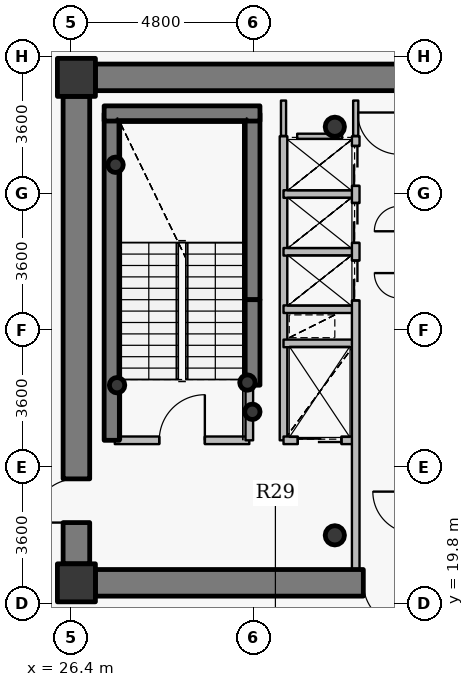
"""IFC4 building model, lengths in metres.
Left out: names, types, materials, properties, quantities, classifications, styles, units other than length and angle.
Written with IfcOpenShell. Run it as: python <this file> out.ifc"""

import sys

from ifc_helpers import new_model, si_unit, direction, frame, frame_2d, origin, origin_2d, place, context, subcontext, project, spatial, rectangle, hollow_circle, extrude, source, transform, mapped, element, fill, save


model = new_model("IFC4")
c1 = context("Model", 3, precision=1e-05, world=origin(), true_north=direction((0.0, 1.0)))
c2 = subcontext(c1, "Body", "Model", "MODEL_VIEW")
j1 = project(units=[si_unit("LENGTHUNIT", "METRE"), si_unit("PLANEANGLEUNIT", "RADIAN")], contexts=[c1])
p1 = place(None, origin())
s1 = spatial("IfcSite", under=j1, at=p1, CompositionType="ELEMENT")
p2 = place(p1, origin())
s2 = spatial("IfcBuilding", under=s1, at=p2, CompositionType="ELEMENT")
p3 = place(p2, frame((0.0, 0.0, 236.55)))
s3 = spatial("IfcBuildingStorey", under=s2, at=p3, CompositionType="ELEMENT", Elevation=236.55)
for number, where, z_axis, x_axis in (
    (1, (26.55, 20.35, 0.0), (0.0, 0.0, 1.0), (1.0, 0.0, 0.0)),
    (2, (26.55, 33.65, 0.0), (0.0, 0.0, 1.0), (1.0, 0.0, 0.0)),
):
    element("IfcColumn", number, at=place(p3, frame(where, z_axis=z_axis, x_axis=x_axis)), inside=s3, PredefinedType="COLUMN", context=c2, shape_type="SweptSolid", body=[
        extrude(rectangle(XDim=1.0, YDim=1.0, at=origin_2d()), origin(), (0.0, 0.0, 1.0), 3.75),
    ])
for number, where, z_axis, x_axis in (
    (3, (33.35, 21.6, 0.0), (0.0, 0.0, 1.0), (1.0, 0.0, 0.0)),
    (4, (33.35, 32.35, 0.0), (0.0, 0.0, 1.0), (1.0, 0.0, 0.0)),
):
    element("IfcColumn", number, at=place(p3, frame(where, z_axis=z_axis, x_axis=x_axis)), inside=s3, PredefinedType="COLUMN", context=c2, shape_type="SweptSolid", body=[
        extrude(hollow_circle(Radius=0.254, WallThickness=0.02, at=origin_2d()), origin(), (0.0, 0.0, 1.0), 3.75),
    ])
p4 = place(p3, frame((27.48, 24.1, 0.0), z_axis=(0.0, 0.0, 1.0), x_axis=(0.0, 1.0, 0.0)))
e5 = element("IfcWall", 5, at=p4, inside=s3, PredefinedType="SHEAR", context=c2, shape_type="SweptSolid", body=[
    extrude(rectangle(XDim=8.6, YDim=0.4, at=frame_2d((4.3, 0.0))), origin(), (0.0, 0.0, 1.0), 3.75),
])
p5 = place(p3, frame((31.18, 27.8, 0.0), z_axis=(0.0, 0.0, 1.0), x_axis=(0.0, 1.0, 0.0)))
e6 = element("IfcWall", 6, at=p5, inside=s3, PredefinedType="SHEAR", context=c2, shape_type="SweptSolid", body=[
    extrude(rectangle(XDim=4.9, YDim=0.4, at=frame_2d((2.45, 0.0))), origin(), (0.0, 0.0, 1.0), 3.75),
])
p6 = place(p3, frame((27.28, 32.7, 0.0), z_axis=(0.0, 0.0, 1.0), x_axis=(1.0, 0.0, 0.0)))
e7 = element("IfcWall", 7, at=p6, inside=s3, PredefinedType="SHEAR", context=c2, shape_type="SweptSolid", body=[
    extrude(rectangle(XDim=4.1, YDim=0.4, at=frame_2d((2.05, 0.0))), origin(), (0.0, 0.0, 1.0), 3.75),
])
for number, where, z_axis, x_axis in (
    (8, (27.58, 31.35, 0.0), (0.0, 0.0, 1.0), (1.0, 0.0, 0.0)),
    (9, (31.05, 25.62, 0.0), (0.0, 0.0, 1.0), (1.0, 0.0, 0.0)),
    (10, (31.18, 24.85, 0.0), (0.0, 0.0, 1.0), (1.0, 0.0, 0.0)),
    (11, (27.62, 25.55, 0.0), (0.0, 0.0, 1.0), (1.0, 0.0, 0.0)),
):
    element("IfcColumn", number, at=place(p3, frame(where, z_axis=z_axis, x_axis=x_axis)), inside=s3, PredefinedType="COLUMN", context=c2, shape_type="SweptSolid", body=[
        extrude(hollow_circle(Radius=0.203, WallThickness=0.016, at=origin_2d()), origin(), (0.0, 0.0, 1.0), 3.75),
    ])
p7 = place(p3, frame((27.05, 33.65, 0.0), z_axis=(0.0, 0.0, 1.0), x_axis=(1.0, 0.0, 0.0)))
e12 = element("IfcWall", 12, at=p7, inside=s3, PredefinedType="SHEAR", context=c2, shape_type="SweptSolid", body=[
    extrude(rectangle(XDim=17.9, YDim=0.7, at=frame_2d((8.95, 0.0))), origin(), (0.0, 0.0, 1.0), 3.05),
])
p8 = place(p7, frame((13.675, 0.0, 0.0)))
e13 = element("IfcOpeningElement", 13, at=p8, cuts=e12, PredefinedType="OPENING", context=c2, shape_type="SweptSolid", body=[
    extrude(rectangle(XDim=1.15, YDim=2.15, at=origin_2d()), frame((0.575, 0.36, 1.075), z_axis=(0.0, -1.0, 0.0), x_axis=(1.0, 0.0, 0.0)), (0.0, 0.0, 1.0), 0.72),
])
p9 = place(p3, frame((44.95, 20.35, 0.0), z_axis=(0.0, 0.0, 1.0), x_axis=(-1.0, 0.0, 0.0)))
e14 = element("IfcWall", 14, at=p9, inside=s3, PredefinedType="SHEAR", context=c2, shape_type="SweptSolid", body=[
    extrude(rectangle(XDim=17.9, YDim=0.7, at=frame_2d((8.95, 0.0))), origin(), (0.0, 0.0, 1.0), 3.05),
])
p10 = place(p9, frame((9.7, 0.0, 0.0)))
e15 = element("IfcOpeningElement", 15, at=p10, cuts=e14, PredefinedType="OPENING", context=c2, shape_type="SweptSolid", body=[
    extrude(rectangle(XDim=1.15, YDim=2.15, at=origin_2d()), frame((0.575, 0.36, 1.075), z_axis=(0.0, -1.0, 0.0), x_axis=(1.0, 0.0, 0.0)), (0.0, 0.0, 1.0), 0.72),
])
p11 = place(p3, frame((26.55, 20.85, 0.0), z_axis=(0.0, 0.0, 1.0), x_axis=(0.0, 1.0, 0.0)))
e16 = element("IfcWall", 16, at=p11, inside=s3, PredefinedType="SHEAR", context=c2, shape_type="SweptSolid", body=[
    extrude(rectangle(XDim=12.3, YDim=0.7, at=frame_2d((6.15, 0.0))), origin(), (0.0, 0.0, 1.0), 3.05),
])
p12 = place(p11, frame((1.085, 0.0, 0.0)))
e17 = element("IfcOpeningElement", 17, at=p12, cuts=e16, PredefinedType="OPENING", context=c2, shape_type="SweptSolid", body=[
    extrude(rectangle(XDim=1.15, YDim=2.15, at=origin_2d()), frame((0.575, 0.36, 1.075), z_axis=(0.0, -1.0, 0.0), x_axis=(1.0, 0.0, 0.0)), (0.0, 0.0, 1.0), 0.72),
])
p13 = place(p3, frame((31.18, 25.55, 0.0), z_axis=(0.0, 0.0, 1.0), x_axis=(0.0, 1.0, 0.0)))
e18 = element("IfcWall", 18, at=p13, inside=s3, PredefinedType="SHEAR", context=c2, shape_type="SweptSolid", body=[
    extrude(rectangle(XDim=2.25, YDim=0.4, at=frame_2d((1.125, 0.0))), origin(), (0.0, 0.0, 1.0), 3.1),
])
p14 = place(p3, frame((27.56, 24.1, 0.0), z_axis=(0.0, 0.0, 1.0), x_axis=(1.0, 0.0, 0.0)))
e19 = element("IfcWall", 19, at=p14, inside=s3, PredefinedType="PARTITIONING", context=c2, shape_type="SweptSolid", body=[
    extrude(rectangle(XDim=3.54, YDim=0.2, at=frame_2d((1.77, 0.0))), origin(), (0.0, 0.0, 1.0), 3.5),
])
p15 = place(p14, frame((1.17, 0.0, 0.0)))
e20 = element("IfcOpeningElement", 20, at=p15, cuts=e19, PredefinedType="OPENING", context=c2, shape_type="SweptSolid", body=[
    extrude(rectangle(XDim=1.2, YDim=2.15, at=origin_2d()), frame((0.6, 0.11, 1.075), z_axis=(0.0, -1.0, 0.0), x_axis=(1.0, 0.0, 0.0)), (0.0, 0.0, 1.0), 0.22),
])
p16 = place(p3, frame((31.1, 24.1, 0.0), z_axis=(0.0, 0.0, 1.0), x_axis=(0.0, 1.0, 0.0)))
e21 = element("IfcWall", 21, at=p16, inside=s3, PredefinedType="PARTITIONING", context=c2, shape_type="SweptSolid", body=[
    extrude(rectangle(XDim=1.44, YDim=0.2, at=frame_2d((0.72, 0.0))), origin(), (0.0, 0.0, 1.0), 3.5),
])
p17 = place(p3, frame((32.0, 24.1, 0.0), z_axis=(0.0, 0.0, 1.0), x_axis=(0.0, 1.0, 0.0)))
e22 = element("IfcWall", 22, at=p17, inside=s3, PredefinedType="PARTITIONING", context=c2, shape_type="SweptSolid", body=[
    extrude(rectangle(XDim=8.0, YDim=0.2, at=frame_2d((4.0, 0.0))), origin(), (0.0, 0.0, 1.0), 3.5),
])
p18 = place(p3, frame((32.0, 24.1, 0.0), z_axis=(0.0, 0.0, 1.0), x_axis=(1.0, 0.0, 0.0)))
e23 = element("IfcWall", 23, at=p18, inside=s3, PredefinedType="PARTITIONING", context=c2, shape_type="SweptSolid", body=[
    extrude(rectangle(XDim=1.9, YDim=0.2, at=frame_2d((0.95, 0.0))), origin(), (0.0, 0.0, 1.0), 3.085),
])
p19 = place(p18, frame((0.375, 0.0, 0.0)))
e24 = element("IfcOpeningElement", 24, at=p19, cuts=e23, PredefinedType="OPENING", context=c2, shape_type="SweptSolid", body=[
    extrude(rectangle(XDim=1.15, YDim=2.15, at=origin_2d()), frame((0.575, 0.11, 1.075), z_axis=(0.0, -1.0, 0.0), x_axis=(1.0, 0.0, 0.0)), (0.0, 0.0, 1.0), 0.22),
])
for number, where, z_axis, x_axis in (
    (25, (32.0, 26.65, 0.0), (0.0, 0.0, 1.0), (1.0, 0.0, 0.0)),
    (26, (32.0, 27.55, 0.0), (0.0, 0.0, 1.0), (1.0, 0.0, 0.0)),
    (27, (32.0, 29.06, 0.0), (0.0, 0.0, 1.0), (1.0, 0.0, 0.0)),
    (28, (32.0, 30.58, 0.0), (0.0, 0.0, 1.0), (1.0, 0.0, 0.0)),
):
    element("IfcWall", number, at=place(p3, frame(where, z_axis=z_axis, x_axis=x_axis)), inside=s3, PredefinedType="PARTITIONING", context=c2, shape_type="SweptSolid", body=[
        extrude(rectangle(XDim=1.9, YDim=0.2, at=frame_2d((0.95, 0.0))), origin(), (0.0, 0.0, 1.0), 3.085),
    ])
p20 = place(p3, frame((33.9, 20.7, 0.0), z_axis=(0.0, 0.0, 1.0), x_axis=(0.0, 1.0, 0.0)))
e29 = element("IfcWall", 29, at=p20, inside=s3, PredefinedType="PARTITIONING", context=c2, shape_type="SweptSolid", body=[
    extrude(rectangle(XDim=11.4, YDim=0.2, at=frame_2d((5.7, 0.0))), origin(), (0.0, 0.0, 1.0), 3.085),
])
p21 = place(p20, frame((7.08, 0.0, 0.0)))
e30 = element("IfcOpeningElement", 30, at=p21, cuts=e29, PredefinedType="OPENING", context=c2, shape_type="SweptSolid", body=[
    extrude(rectangle(XDim=1.05, YDim=2.15, at=origin_2d()), frame((0.525, 0.11, 1.075), z_axis=(0.0, -1.0, 0.0), x_axis=(1.0, 0.0, 0.0)), (0.0, 0.0, 1.0), 0.22),
])
p22 = place(p20, frame((8.595, 0.0, 0.0)))
e31 = element("IfcOpeningElement", 31, at=p22, cuts=e29, PredefinedType="OPENING", context=c2, shape_type="SweptSolid", body=[
    extrude(rectangle(XDim=1.05, YDim=2.15, at=origin_2d()), frame((0.525, 0.11, 1.075), z_axis=(0.0, -1.0, 0.0), x_axis=(1.0, 0.0, 0.0)), (0.0, 0.0, 1.0), 0.22),
])
p23 = place(p20, frame((10.095, 0.0, 0.0)))
e32 = element("IfcOpeningElement", 32, at=p23, cuts=e29, PredefinedType="OPENING", context=c2, shape_type="SweptSolid", body=[
    extrude(rectangle(XDim=1.05, YDim=2.15, at=origin_2d()), frame((0.525, 0.11, 1.075), z_axis=(0.0, -1.0, 0.0), x_axis=(1.0, 0.0, 0.0)), (0.0, 0.0, 1.0), 0.22),
])
p24 = place(p3, frame((32.36, 32.1, 0.0), z_axis=(0.0, 0.0, 1.0), x_axis=(1.0, 0.0, 0.0)))
e33 = element("IfcWall", 33, at=p24, inside=s3, PredefinedType="PARTITIONING", context=c2, shape_type="SweptSolid", body=[
    extrude(rectangle(XDim=1.18, YDim=0.135, at=frame_2d((0.59, 0.0))), origin(), (0.0, 0.0, 1.0), 3.085),
])
p25 = place(p3, frame((32.0, 33.04, 0.0), z_axis=(0.0, 0.0, 1.0), x_axis=(0.0, -1.0, 0.0)))
e34 = element("IfcWall", 34, at=p25, inside=s3, PredefinedType="PARTITIONING", context=c2, shape_type="SweptSolid", body=[
    extrude(rectangle(XDim=0.93, YDim=0.135, at=frame_2d((0.465, 0.0))), origin(), (0.0, 0.0, 1.0), 3.035),
])
p26 = place(p3, frame((33.9, 32.11, 0.0), z_axis=(0.0, 0.0, 1.0), x_axis=(0.0, 1.0, 0.0)))
e35 = element("IfcWall", 35, at=p26, inside=s3, PredefinedType="PARTITIONING", context=c2, shape_type="SweptSolid", body=[
    extrude(rectangle(XDim=0.93, YDim=0.135, at=frame_2d((0.465, 0.0))), origin(), (0.0, 0.0, 1.0), 3.085),
])
p27 = place(p3, frame((27.04, 34.0, 0.0), z_axis=(0.0, 0.0, 1.0), x_axis=(-1.0, 0.0, 0.0)))
e36 = element("IfcWall", 36, at=p27, inside=s3, PredefinedType="PARTITIONING", context=c2, shape_type="SweptSolid", body=[
    extrude(rectangle(XDim=0.84, YDim=0.135, at=frame_2d((0.42, 0.0))), origin(), (0.0, 0.0, 1.0), 2.935),
])
p28 = place(p3, frame((26.2, 33.692, 0.0), z_axis=(0.0, 0.0, 1.0), x_axis=(0.0, -1.0, 0.0)))
e37 = element("IfcWall", 37, at=p28, inside=s3, PredefinedType="PARTITIONING", context=c2, shape_type="SweptSolid", body=[
    extrude(rectangle(XDim=0.532, YDim=0.135, at=frame_2d((0.266, 0.0))), origin(), (0.0, 0.0, 1.0), 3.5),
])
p29 = place(p3, frame((26.2, 20.84, 0.0), z_axis=(0.0, 0.0, 1.0), x_axis=(0.0, -1.0, 0.0)))
e38 = element("IfcWall", 38, at=p29, inside=s3, PredefinedType="PARTITIONING", context=c2, shape_type="SweptSolid", body=[
    extrude(rectangle(XDim=0.84, YDim=0.135, at=frame_2d((0.42, 0.0))), origin(), (0.0, 0.0, 1.0), 3.185),
])
p30 = place(p3, frame((26.508, 20.0, 0.0), z_axis=(0.0, 0.0, 1.0), x_axis=(1.0, 0.0, 0.0)))
e39 = element("IfcWall", 39, at=p30, inside=s3, PredefinedType="PARTITIONING", context=c2, shape_type="SweptSolid", body=[
    extrude(rectangle(XDim=0.532, YDim=0.135, at=frame_2d((0.266, 0.0))), origin(), (0.0, 0.0, 1.0), 2.935),
])
m1 = source(origin(), c2, "Body", "SweptSolid", [
    extrude(rectangle(XDim=1.15, YDim=2.15, at=origin_2d()), frame((0.575, 0.025, 1.075), z_axis=(0.0, -1.0, 0.0), x_axis=(1.0, 0.0, 0.0)), (0.0, 0.0, 1.0), 0.05),
])
p31 = place(p12, origin())
e40 = element("IfcDoor", 40, at=p31, inside=s3, OperationType="SINGLE_SWING_LEFT", PredefinedType="DOOR", context=c2, shape_type="MappedRepresentation", body=[
    mapped(m1, transform((0.0, 0.0, 0.0), x_axis=(1.0, 0.0, 0.0), y_axis=(0.0, 1.0, 0.0), z_axis=(0.0, 0.0, 1.0), scale=1.0)),
])
fill(e17, e40)
p32 = place(p10, origin())
e41 = element("IfcDoor", 41, at=p32, inside=s3, OperationType="SINGLE_SWING_LEFT", PredefinedType="DOOR", context=c2, shape_type="MappedRepresentation", body=[
    mapped(m1, transform((0.0, 0.0, 0.0), x_axis=(1.0, 0.0, 0.0), y_axis=(0.0, 1.0, 0.0), z_axis=(0.0, 0.0, 1.0), scale=1.0)),
])
fill(e15, e41)
m2 = source(origin(), c2, "Body", "SweptSolid", [
    extrude(rectangle(XDim=1.2, YDim=2.15, at=origin_2d()), frame((0.6, 0.025, 1.075), z_axis=(0.0, -1.0, 0.0), x_axis=(1.0, 0.0, 0.0)), (0.0, 0.0, 1.0), 0.05),
])
p33 = place(p15, origin())
e42 = element("IfcDoor", 42, at=p33, inside=s3, OperationType="SINGLE_SWING_RIGHT", PredefinedType="DOOR", context=c2, shape_type="MappedRepresentation", body=[
    mapped(m2, transform((0.0, 0.0, 0.0), x_axis=(1.0, 0.0, 0.0), y_axis=(0.0, 1.0, 0.0), z_axis=(0.0, 0.0, 1.0), scale=1.0)),
])
fill(e20, e42)
m3 = source(origin(), c2, "Body", "SweptSolid", [
    extrude(rectangle(XDim=1.15, YDim=2.15, at=origin_2d()), frame((0.575, 0.025, 1.075), z_axis=(0.0, -1.0, 0.0), x_axis=(1.0, 0.0, 0.0)), (0.0, 0.0, 1.0), 0.05),
])
p34 = place(p19, origin())
e43 = element("IfcDoor", 43, at=p34, inside=s3, OperationType="DOUBLE_DOOR_SLIDING", PredefinedType="USERDEFINED", context=c2, shape_type="MappedRepresentation", body=[
    mapped(m3, transform((0.0, 0.0, 0.0), x_axis=(1.0, 0.0, 0.0), y_axis=(0.0, 1.0, 0.0), z_axis=(0.0, 0.0, 1.0), scale=1.0)),
])
fill(e24, e43)
m4 = source(origin(), c2, "Body", "SweptSolid", [
    extrude(rectangle(XDim=1.05, YDim=2.15, at=origin_2d()), frame((0.525, 0.025, 1.075), z_axis=(0.0, -1.0, 0.0), x_axis=(1.0, 0.0, 0.0)), (0.0, 0.0, 1.0), 0.05),
])
p35 = place(p21, origin())
e44 = element("IfcDoor", 44, at=p35, inside=s3, OperationType="DOUBLE_DOOR_SLIDING", PredefinedType="USERDEFINED", context=c2, shape_type="MappedRepresentation", body=[
    mapped(m4, transform((0.0, 0.0, 0.0), x_axis=(1.0, 0.0, 0.0), y_axis=(0.0, 1.0, 0.0), z_axis=(0.0, 0.0, 1.0), scale=1.0)),
])
fill(e30, e44)
p36 = place(p22, origin())
e45 = element("IfcDoor", 45, at=p36, inside=s3, OperationType="DOUBLE_DOOR_SLIDING", PredefinedType="USERDEFINED", context=c2, shape_type="MappedRepresentation", body=[
    mapped(m4, transform((0.0, 0.0, 0.0), x_axis=(1.0, 0.0, 0.0), y_axis=(0.0, 1.0, 0.0), z_axis=(0.0, 0.0, 1.0), scale=1.0)),
])
fill(e31, e45)
p37 = place(p23, origin())
e46 = element("IfcDoor", 46, at=p37, inside=s3, OperationType="DOUBLE_DOOR_SLIDING", PredefinedType="USERDEFINED", context=c2, shape_type="MappedRepresentation", body=[
    mapped(m4, transform((0.0, 0.0, 0.0), x_axis=(1.0, 0.0, 0.0), y_axis=(0.0, 1.0, 0.0), z_axis=(0.0, 0.0, 1.0), scale=1.0)),
])
fill(e32, e46)
save(model, sys.argv[1])
